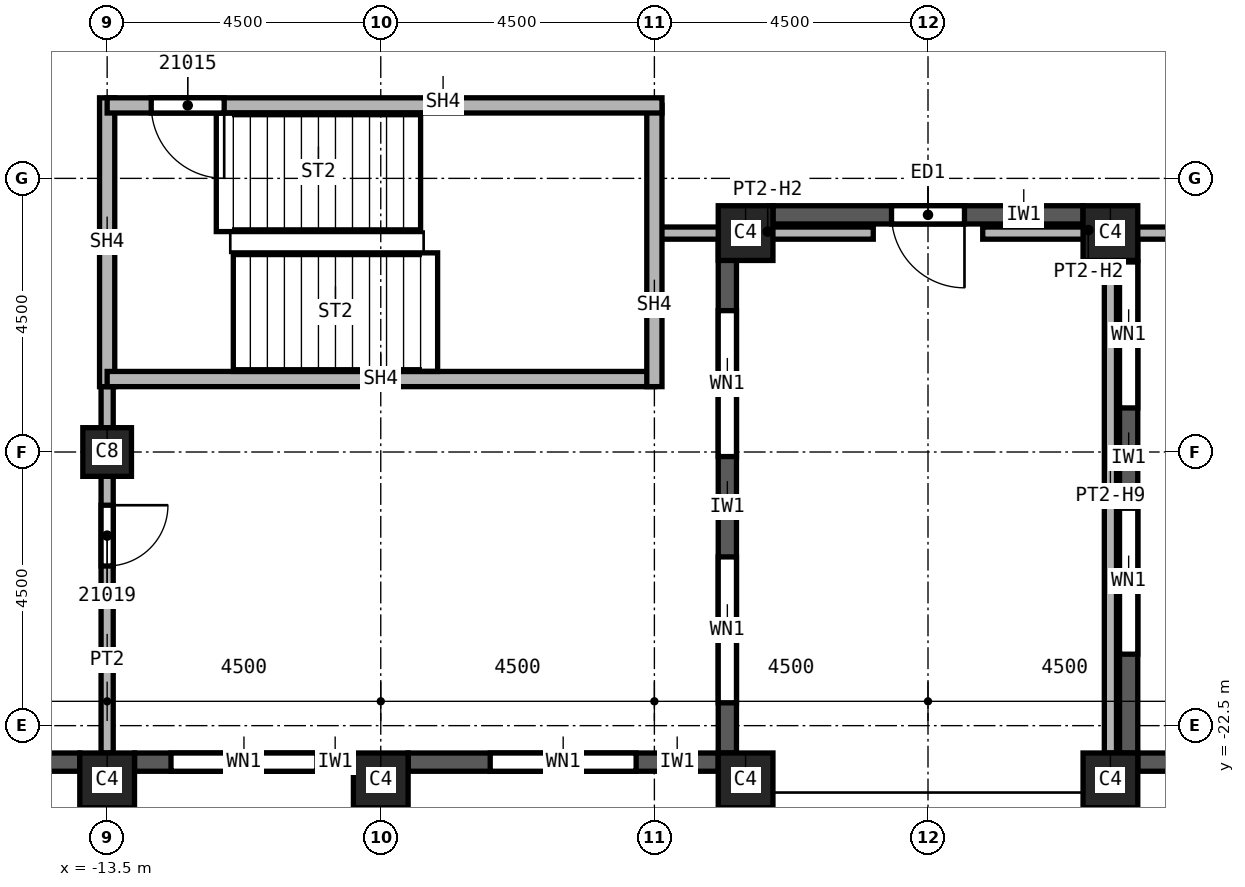
"""IFC4 building model, lengths in metres.
Left out: names, types, materials, properties, quantities, classifications, styles, units other than length and angle.
Written with IfcOpenShell. Run it as: python <this file> out.ifc"""

import sys

from ifc_helpers import new_model, si_unit, direction, frame, frame_2d, origin, origin_2d, place, context, subcontext, project, spatial, rectangle, extrude, element, fill, save


model = new_model("IFC4")
c1 = context("Model", 3, precision=1e-05, world=origin(), true_north=direction((0.0, 1.0)))
c2 = subcontext(c1, "Body", "Model", "MODEL_VIEW")
j1 = project(units=[si_unit("LENGTHUNIT", "METRE"), si_unit("PLANEANGLEUNIT", "RADIAN")], contexts=[c1])
p1 = place(None, origin())
s1 = spatial("IfcSite", under=j1, at=p1, CompositionType="ELEMENT")
p2 = place(p1, origin())
s2 = spatial("IfcBuilding", under=s1, at=p2, CompositionType="ELEMENT")
p3 = place(p2, frame((0.0, 0.0, 300.0)))
s3 = spatial("IfcBuildingStorey", under=s2, at=p3, CompositionType="ELEMENT", Elevation=300.0)
p4 = place(p3, frame((-13.5, -18.0, 0.0), z_axis=(0.0, 0.0, 1.0), x_axis=(1.0, 0.0, 0.0)))
e1 = element("IfcColumn", 1, at=p4, inside=s3, PredefinedType="COLUMN", context=c2, shape_type="SweptSolid", body=[
    extrude(rectangle(XDim=0.8, YDim=0.8, at=origin_2d()), origin(), (0.0, 0.0, 1.0), 3.74),
])
for number, where, z_axis, x_axis in (
    (2, (3.0, -23.4, 0.0), (0.0, 0.0, 1.0), (1.0, 0.0, 0.0)),
    (3, (-3.0, -23.4, 0.0), (0.0, 0.0, 1.0), (1.0, 0.0, 0.0)),
    (4, (-9.0, -23.4, 0.0), (0.0, 0.0, 1.0), (1.0, 0.0, 0.0)),
    (5, (-13.5, -23.4, 0.0), (0.0, 0.0, 1.0), (1.0, 0.0, 0.0)),
    (6, (3.0, -14.4, 0.0), (0.0, 0.0, 1.0), (1.0, 0.0, 0.0)),
    (7, (-3.0, -14.4, 0.0), (0.0, 0.0, 1.0), (1.0, 0.0, 0.0)),
):
    element("IfcColumn", number, at=place(p3, frame(where, z_axis=z_axis, x_axis=x_axis)), inside=s3, PredefinedType="COLUMN", context=c2, shape_type="SweptSolid", body=[
        extrude(rectangle(XDim=0.9, YDim=0.9, at=origin_2d()), origin(), (0.0, 0.0, 1.0), 3.74),
    ])
p5 = place(p3, frame((-17.55, -23.1, 0.0), z_axis=(0.0, 0.0, 1.0), x_axis=(1.0, 0.0, 0.0)))
e8 = element("IfcWall", 8, at=p5, inside=s3, PredefinedType="SOLIDWALL", context=c2, shape_type="SweptSolid", body=[
    extrude(rectangle(XDim=3.6, YDim=0.3, at=frame_2d((1.8, 0.0))), origin(), (0.0, 0.0, 1.0), 3.14),
])
p6 = place(p5, frame((0.775, 0.0, 0.8)))
e9 = element("IfcOpeningElement", 9, at=p6, cuts=e8, PredefinedType="OPENING", context=c2, shape_type="SweptSolid", body=[
    extrude(rectangle(XDim=1.0, YDim=1.95, at=frame_2d((0.5, 0.975))), frame((0.0, 0.15, 0.0), z_axis=(0.0, -1.0, 0.0), x_axis=(1.0, 0.0, 0.0)), (0.0, 0.0, 1.0), 0.3),
])
p7 = place(p5, frame((2.375, 0.0, 0.8)))
e10 = element("IfcOpeningElement", 10, at=p7, cuts=e8, PredefinedType="OPENING", context=c2, shape_type="SweptSolid", body=[
    extrude(rectangle(XDim=0.6, YDim=1.95, at=frame_2d((0.3, 0.975))), frame((0.0, 0.15, 0.0), z_axis=(0.0, -1.0, 0.0), x_axis=(1.0, 0.0, 0.0)), (0.0, 0.0, 1.0), 0.3),
])
p8 = place(p3, frame((-13.05, -23.1, 0.0), z_axis=(0.0, 0.0, 1.0), x_axis=(1.0, 0.0, 0.0)))
e11 = element("IfcWall", 11, at=p8, inside=s3, PredefinedType="SOLIDWALL", context=c2, shape_type="SweptSolid", body=[
    extrude(rectangle(XDim=3.6, YDim=0.3, at=frame_2d((1.8, 0.0))), origin(), (0.0, 0.0, 1.0), 3.14),
])
p9 = place(p8, frame((0.6, 0.0, 0.8)))
e12 = element("IfcOpeningElement", 12, at=p9, cuts=e11, PredefinedType="OPENING", context=c2, shape_type="SweptSolid", body=[
    extrude(rectangle(XDim=2.4, YDim=1.95, at=frame_2d((1.2, 0.975))), frame((0.0, 0.15, 0.0), z_axis=(0.0, -1.0, 0.0), x_axis=(1.0, 0.0, 0.0)), (0.0, 0.0, 1.0), 0.3),
])
p10 = place(p3, frame((-8.55, -23.1, 0.0), z_axis=(0.0, 0.0, 1.0), x_axis=(1.0, 0.0, 0.0)))
e13 = element("IfcWall", 13, at=p10, inside=s3, PredefinedType="SOLIDWALL", context=c2, shape_type="SweptSolid", body=[
    extrude(rectangle(XDim=5.1, YDim=0.3, at=frame_2d((2.55, 0.0))), origin(), (0.0, 0.0, 1.0), 3.14),
])
p11 = place(p10, frame((1.35, 0.0, 0.8)))
e14 = element("IfcOpeningElement", 14, at=p11, cuts=e13, PredefinedType="OPENING", context=c2, shape_type="SweptSolid", body=[
    extrude(rectangle(XDim=2.4, YDim=1.95, at=frame_2d((1.2, 0.975))), frame((0.0, 0.15, 0.0), z_axis=(0.0, -1.0, 0.0), x_axis=(1.0, 0.0, 0.0)), (0.0, 0.0, 1.0), 0.3),
])
p12 = place(p3, frame((-3.3, -22.95, 0.0), z_axis=(0.0, 0.0, 1.0), x_axis=(0.0, 1.0, 0.0)))
e15 = element("IfcWall", 15, at=p12, inside=s3, PredefinedType="SOLIDWALL", context=c2, shape_type="SweptSolid", body=[
    extrude(rectangle(XDim=8.5, YDim=0.3, at=frame_2d((4.25, 0.0))), origin(), (0.0, 0.0, 1.0), 3.14),
])
p13 = place(p12, frame((0.825, 0.0, 0.8)))
e16 = element("IfcOpeningElement", 16, at=p13, cuts=e15, PredefinedType="OPENING", context=c2, shape_type="SweptSolid", body=[
    extrude(rectangle(XDim=2.4, YDim=1.95, at=frame_2d((1.2, 0.975))), frame((0.0, 0.15, 0.0), z_axis=(0.0, -1.0, 0.0), x_axis=(1.0, 0.0, 0.0)), (0.0, 0.0, 1.0), 0.3),
])
p14 = place(p12, frame((4.875, 0.0, 0.8)))
e17 = element("IfcOpeningElement", 17, at=p14, cuts=e15, PredefinedType="OPENING", context=c2, shape_type="SweptSolid", body=[
    extrude(rectangle(XDim=2.4, YDim=1.95, at=frame_2d((1.2, 0.975))), frame((0.0, 0.15, 0.0), z_axis=(0.0, -1.0, 0.0), x_axis=(1.0, 0.0, 0.0)), (0.0, 0.0, 1.0), 0.3),
])
p15 = place(p3, frame((2.55, -14.1, 0.0), z_axis=(0.0, 0.0, 1.0), x_axis=(-1.0, 0.0, 0.0)))
e18 = element("IfcWall", 18, at=p15, inside=s3, PredefinedType="SOLIDWALL", context=c2, shape_type="SweptSolid", body=[
    extrude(rectangle(XDim=5.1, YDim=0.3, at=frame_2d((2.55, 0.0))), origin(), (0.0, 0.0, 1.0), 3.14),
])
p16 = place(p15, frame((1.95, 0.0, 0.0)))
e19 = element("IfcOpeningElement", 19, at=p16, cuts=e18, PredefinedType="OPENING", context=c2, shape_type="SweptSolid", body=[
    extrude(rectangle(XDim=1.2, YDim=2.4, at=frame_2d((0.6, 1.2))), frame((0.0, 0.15, 0.0), z_axis=(0.0, -1.0, 0.0), x_axis=(1.0, 0.0, 0.0)), (0.0, 0.0, 1.0), 0.3),
])
p17 = place(p3, frame((3.3, -14.45, 0.0), z_axis=(0.0, 0.0, 1.0), x_axis=(0.0, -1.0, 0.0)))
e20 = element("IfcWall", 20, at=p17, inside=s3, PredefinedType="SOLIDWALL", context=c2, shape_type="SweptSolid", body=[
    extrude(rectangle(XDim=8.5, YDim=0.3, at=frame_2d((4.25, 0.0))), origin(), (0.0, 0.0, 1.0), 3.14),
])
p18 = place(p17, frame((0.425, 0.0, 0.8)))
e21 = element("IfcOpeningElement", 21, at=p18, cuts=e20, PredefinedType="OPENING", context=c2, shape_type="SweptSolid", body=[
    extrude(rectangle(XDim=2.4, YDim=1.95, at=frame_2d((1.2, 0.975))), frame((0.0, 0.15, 0.0), z_axis=(0.0, -1.0, 0.0), x_axis=(1.0, 0.0, 0.0)), (0.0, 0.0, 1.0), 0.3),
])
p19 = place(p17, frame((4.475, 0.0, 0.8)))
e22 = element("IfcOpeningElement", 22, at=p19, cuts=e20, PredefinedType="OPENING", context=c2, shape_type="SweptSolid", body=[
    extrude(rectangle(XDim=2.4, YDim=1.95, at=frame_2d((1.2, 0.975))), frame((0.0, 0.15, 0.0), z_axis=(0.0, -1.0, 0.0), x_axis=(1.0, 0.0, 0.0)), (0.0, 0.0, 1.0), 0.3),
])
p20 = place(p3, frame((3.45, -23.1, 0.0), z_axis=(0.0, 0.0, 1.0), x_axis=(1.0, 0.0, 0.0)))
e23 = element("IfcWall", 23, at=p20, inside=s3, PredefinedType="SOLIDWALL", context=c2, shape_type="SweptSolid", body=[
    extrude(rectangle(XDim=5.1, YDim=0.3, at=frame_2d((2.55, 0.0))), origin(), (0.0, 0.0, 1.0), 3.14),
])
p21 = place(p20, frame((1.35, 0.0, 0.8)))
e24 = element("IfcOpeningElement", 24, at=p21, cuts=e23, PredefinedType="OPENING", context=c2, shape_type="SweptSolid", body=[
    extrude(rectangle(XDim=2.4, YDim=1.95, at=frame_2d((1.2, 0.975))), frame((0.0, 0.15, 0.0), z_axis=(0.0, -1.0, 0.0), x_axis=(1.0, 0.0, 0.0)), (0.0, 0.0, 1.0), 0.3),
])
p22 = place(p3, frame((-13.5, -16.675, 0.0), z_axis=(0.0, 0.0, 1.0), x_axis=(0.0, -1.0, 0.0)))
e25 = element("IfcWall", 25, at=p22, inside=s3, PredefinedType="PARTITIONING", context=c2, shape_type="SweptSolid", body=[
    extrude(rectangle(XDim=6.275, YDim=0.2, at=frame_2d((3.137, 0.0))), origin(), (0.0, 0.0, 1.0), 3.74),
])
p23 = place(p22, frame((2.2, 0.0, 0.0)))
e26 = element("IfcOpeningElement", 26, at=p23, cuts=e25, PredefinedType="OPENING", context=c2, shape_type="SweptSolid", body=[
    extrude(rectangle(XDim=1.0, YDim=2.1, at=frame_2d((0.5, 1.05))), frame((0.0, 0.1, 0.0), z_axis=(0.0, -1.0, 0.0), x_axis=(1.0, 0.0, 0.0)), (0.0, 0.0, 1.0), 0.2),
])
p24 = place(p3, frame((-0.9, -14.4, 0.0), z_axis=(0.0, 0.0, 1.0), x_axis=(-1.0, 0.0, 0.0)))
e27 = element("IfcWall", 27, at=p24, inside=s3, PredefinedType="PARTITIONING", context=c2, shape_type="SweptSolid", body=[
    extrude(rectangle(XDim=3.6, YDim=0.2, at=frame_2d((1.8, 0.0))), origin(), (0.0, 0.0, 1.0), 3.207),
])
p25 = place(p3, frame((3.0, -14.4, 0.0), z_axis=(0.0, 0.0, 1.0), x_axis=(0.0, -1.0, 0.0)))
e28 = element("IfcWall", 28, at=p25, inside=s3, PredefinedType="PARTITIONING", context=c2, shape_type="SweptSolid", body=[
    extrude(rectangle(XDim=8.55, YDim=0.2, at=frame_2d((4.275, 0.0))), origin(), (0.0, 0.0, 1.0), 2.894),
])
p26 = place(p3, frame((4.5, -14.4, 0.0), z_axis=(0.0, 0.0, 1.0), x_axis=(-1.0, 0.0, 0.0)))
e29 = element("IfcWall", 29, at=p26, inside=s3, PredefinedType="PARTITIONING", context=c2, shape_type="SweptSolid", body=[
    extrude(rectangle(XDim=3.6, YDim=0.2, at=frame_2d((1.8, 0.0))), origin(), (0.0, 0.0, 1.0), 3.207),
])
p27 = place(p3, frame((-13.5, -12.175, 0.0), z_axis=(0.0, 0.0, 1.0), x_axis=(0.0, -1.0, 0.0)))
e30 = element("IfcWall", 30, at=p27, inside=s3, PredefinedType="SOLIDWALL", context=c2, shape_type="SweptSolid", body=[
    extrude(rectangle(XDim=4.75, YDim=0.25, at=frame_2d((2.375, 0.0))), origin(), (0.0, 0.0, 1.0), 3.74),
])
p28 = place(p3, frame((-4.5, -16.8, 0.0), z_axis=(0.0, 0.0, 1.0), x_axis=(-1.0, 0.0, 0.0)))
e31 = element("IfcWall", 31, at=p28, inside=s3, PredefinedType="SOLIDWALL", context=c2, shape_type="SweptSolid", body=[
    extrude(rectangle(XDim=9.0, YDim=0.25, at=frame_2d((4.5, 0.0))), origin(), (0.0, 0.0, 1.0), 3.74),
])
p29 = place(p3, frame((-4.5, -12.3, 0.0), z_axis=(0.0, 0.0, 1.0), x_axis=(0.0, -1.0, 0.0)))
e32 = element("IfcWall", 32, at=p29, inside=s3, PredefinedType="SOLIDWALL", context=c2, shape_type="SweptSolid", body=[
    extrude(rectangle(XDim=4.625, YDim=0.25, at=frame_2d((2.312, 0.0))), origin(), (0.0, 0.0, 1.0), 3.74),
])
p30 = place(p3, frame((-4.375, -12.3, 0.0), z_axis=(0.0, 0.0, 1.0), x_axis=(-1.0, 0.0, 0.0)))
e33 = element("IfcWall", 33, at=p30, inside=s3, PredefinedType="SOLIDWALL", context=c2, shape_type="SweptSolid", body=[
    extrude(rectangle(XDim=9.125, YDim=0.25, at=frame_2d((4.562, 0.0))), origin(), (0.0, 0.0, 1.0), 3.74),
])
p31 = place(p30, frame((7.2, 0.0, 0.0)))
e34 = element("IfcOpeningElement", 34, at=p31, cuts=e33, PredefinedType="OPENING", context=c2, shape_type="SweptSolid", body=[
    extrude(rectangle(XDim=1.2, YDim=2.1, at=frame_2d((0.6, 1.05))), frame((0.0, 0.125, 0.0), z_axis=(0.0, -1.0, 0.0), x_axis=(1.0, 0.0, 0.0)), (0.0, 0.0, 1.0), 0.25),
])
p32 = place(p9, origin())
e35 = element("IfcWindow", 35, at=p32, inside=s3, PartitioningType="SINGLE_PANEL", PredefinedType="WINDOW", context=c2, shape_type="SweptSolid", body=[
    extrude(rectangle(XDim=2.4, YDim=1.95, at=frame_2d((1.2, 0.975))), frame((0.0, 0.03, 0.0), z_axis=(0.0, -1.0, 0.0), x_axis=(1.0, 0.0, 0.0)), (0.0, 0.0, 1.0), 0.06),
])
fill(e12, e35)
p33 = place(p11, origin())
e36 = element("IfcWindow", 36, at=p33, inside=s3, PartitioningType="SINGLE_PANEL", PredefinedType="WINDOW", context=c2, shape_type="SweptSolid", body=[
    extrude(rectangle(XDim=2.4, YDim=1.95, at=frame_2d((1.2, 0.975))), frame((0.0, 0.03, 0.0), z_axis=(0.0, -1.0, 0.0), x_axis=(1.0, 0.0, 0.0)), (0.0, 0.0, 1.0), 0.06),
])
fill(e14, e36)
p34 = place(p13, origin())
e37 = element("IfcWindow", 37, at=p34, inside=s3, PartitioningType="SINGLE_PANEL", PredefinedType="WINDOW", context=c2, shape_type="SweptSolid", body=[
    extrude(rectangle(XDim=2.4, YDim=1.95, at=frame_2d((1.2, 0.975))), frame((0.0, 0.03, 0.0), z_axis=(0.0, -1.0, 0.0), x_axis=(1.0, 0.0, 0.0)), (0.0, 0.0, 1.0), 0.06),
])
fill(e16, e37)
p35 = place(p14, origin())
e38 = element("IfcWindow", 38, at=p35, inside=s3, PartitioningType="SINGLE_PANEL", PredefinedType="WINDOW", context=c2, shape_type="SweptSolid", body=[
    extrude(rectangle(XDim=2.4, YDim=1.95, at=frame_2d((1.2, 0.975))), frame((0.0, 0.03, 0.0), z_axis=(0.0, -1.0, 0.0), x_axis=(1.0, 0.0, 0.0)), (0.0, 0.0, 1.0), 0.06),
])
fill(e17, e38)
p36 = place(p16, origin())
e39 = element("IfcDoor", 39, at=p36, inside=s3, OperationType="SINGLE_SWING_LEFT", PredefinedType="DOOR", context=c2, shape_type="SweptSolid", body=[
    extrude(rectangle(XDim=1.2, YDim=2.4, at=frame_2d((0.6, 1.2))), frame((0.0, 0.025, 0.0), z_axis=(0.0, -1.0, 0.0), x_axis=(1.0, 0.0, 0.0)), (0.0, 0.0, 1.0), 0.05),
])
fill(e19, e39)
p37 = place(p18, origin())
e40 = element("IfcWindow", 40, at=p37, inside=s3, PartitioningType="SINGLE_PANEL", PredefinedType="WINDOW", context=c2, shape_type="SweptSolid", body=[
    extrude(rectangle(XDim=2.4, YDim=1.95, at=frame_2d((1.2, 0.975))), frame((0.0, 0.03, 0.0), z_axis=(0.0, -1.0, 0.0), x_axis=(1.0, 0.0, 0.0)), (0.0, 0.0, 1.0), 0.06),
])
fill(e21, e40)
p38 = place(p19, origin())
e41 = element("IfcWindow", 41, at=p38, inside=s3, PartitioningType="SINGLE_PANEL", PredefinedType="WINDOW", context=c2, shape_type="SweptSolid", body=[
    extrude(rectangle(XDim=2.4, YDim=1.95, at=frame_2d((1.2, 0.975))), frame((0.0, 0.03, 0.0), z_axis=(0.0, -1.0, 0.0), x_axis=(1.0, 0.0, 0.0)), (0.0, 0.0, 1.0), 0.06),
])
fill(e22, e41)
p39 = place(p31, origin())
e42 = element("IfcDoor", 42, at=p39, inside=s3, OperationType="SINGLE_SWING_RIGHT", PredefinedType="DOOR", context=c2, shape_type="SweptSolid", body=[
    extrude(rectangle(XDim=1.2, YDim=2.1, at=frame_2d((0.6, 1.05))), frame((0.0, 0.025, 0.0), z_axis=(0.0, -1.0, 0.0), x_axis=(1.0, 0.0, 0.0)), (0.0, 0.0, 1.0), 0.05),
])
fill(e34, e42)
p40 = place(p23, origin())
e43 = element("IfcDoor", 43, at=p40, inside=s3, OperationType="SINGLE_SWING_RIGHT", PredefinedType="DOOR", context=c2, shape_type="SweptSolid", body=[
    extrude(rectangle(XDim=1.0, YDim=2.1, at=frame_2d((0.5, 1.05))), frame((0.0, 0.025, 0.0), z_axis=(0.0, -1.0, 0.0), x_axis=(1.0, 0.0, 0.0)), (0.0, 0.0, 1.0), 0.05),
])
fill(e26, e43)
save(model, sys.argv[1])
